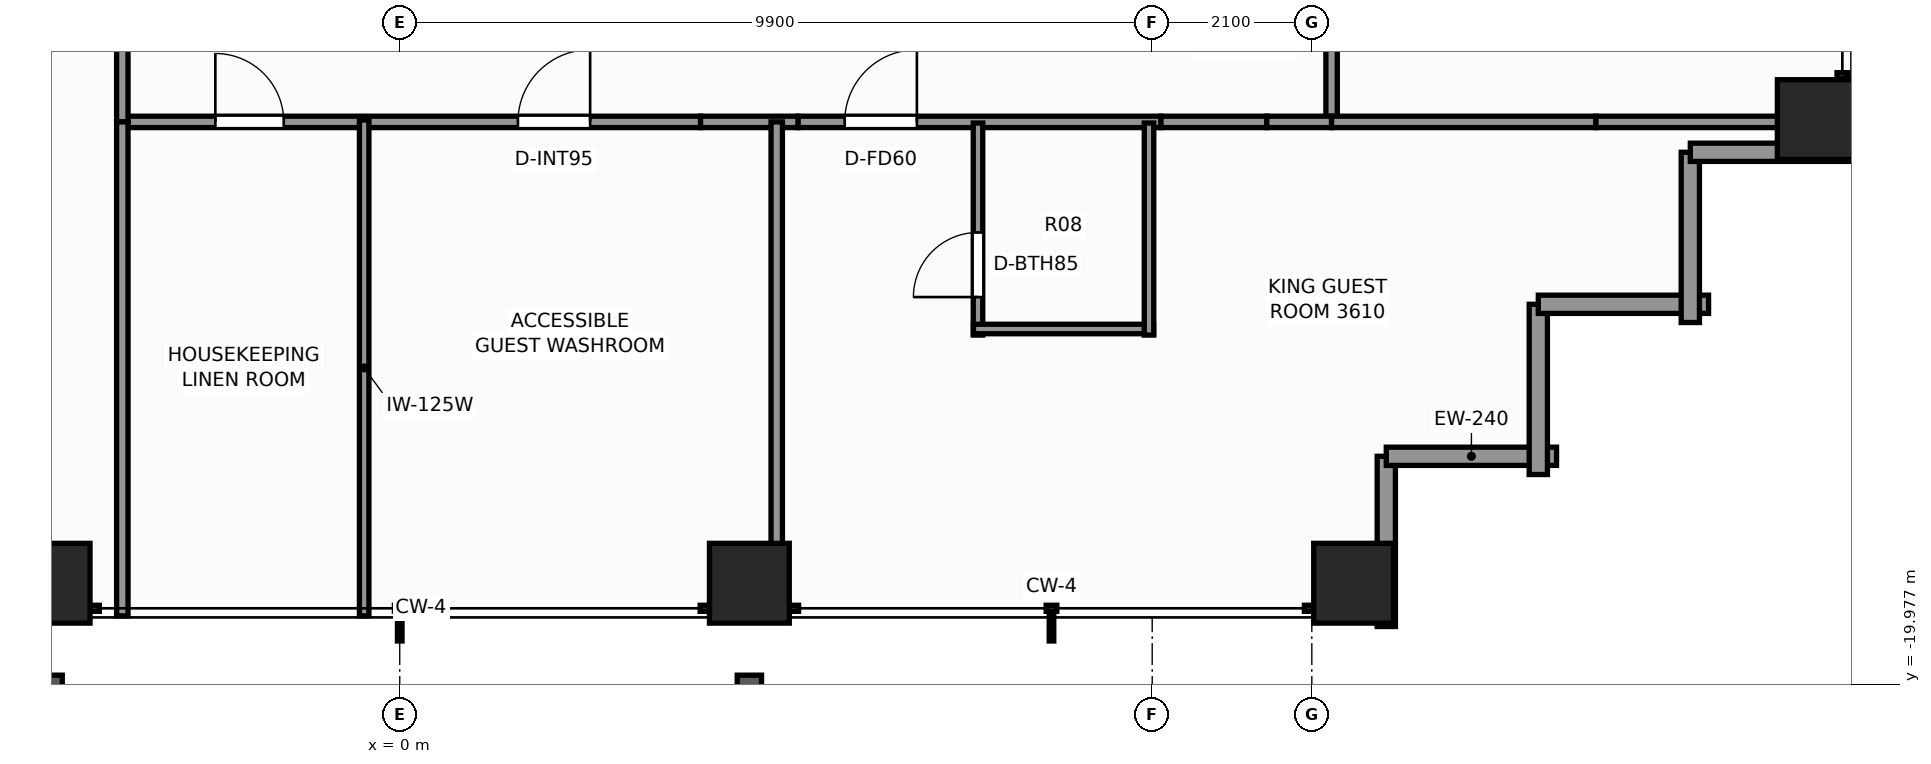
"""IFC4 building model, lengths in metres.
Left out: names, types, materials, properties, quantities, classifications, styles, units other than length and angle.
Written with IfcOpenShell. Run it as: python <this file> out.ifc"""

import sys

from ifc_helpers import new_model, si_unit, direction, frame, frame_2d, origin, origin_2d, place, context, subcontext, project, spatial, rectangle, extrude, element, fill, save


model = new_model("IFC4")
c1 = context("Model", 3, precision=1e-05, world=origin(), true_north=direction((0.0, 1.0)))
c2 = subcontext(c1, "Body", "Model", "MODEL_VIEW")
j1 = project(units=[si_unit("LENGTHUNIT", "METRE"), si_unit("PLANEANGLEUNIT", "RADIAN")], contexts=[c1])
p1 = place(None, origin())
s1 = spatial("IfcSite", under=j1, at=p1, CompositionType="ELEMENT")
p2 = place(p1, origin())
s2 = spatial("IfcBuilding", under=s1, at=p2, CompositionType="ELEMENT")
p3 = place(p2, frame((0.0, 0.0, 125.0)))
s3 = spatial("IfcBuildingStorey", under=s2, at=p3, CompositionType="ELEMENT", Elevation=125.0)
for number, where, z_axis, x_axis in (
    (1, (-4.6, -18.65, 0.0), (0.0, 0.0, 1.0), (1.0, 0.0, 0.0)),
    (2, (4.6, -18.65, 0.0), (0.0, 0.0, 1.0), (1.0, 0.0, 0.0)),
    (3, (12.55, -18.65, 0.0), (0.0, 0.0, 1.0), (1.0, 0.0, 0.0)),
    (4, (18.65, -12.55, 0.0), (0.0, 0.0, 1.0), (1.0, 0.0, 0.0)),
):
    element("IfcColumn", number, at=place(p3, frame(where, z_axis=z_axis, x_axis=x_axis)), inside=s3, PredefinedType="COLUMN", context=c2, shape_type="SweptSolid", body=[
        extrude(rectangle(XDim=1.05, YDim=1.05, at=origin_2d()), origin(), (0.0, 0.0, 1.0), 3.3),
    ])
for number, where, z_axis, x_axis in (
    (5, (12.98, -16.98, 0.0), (0.0, 0.0, 1.0), (0.0, -1.0, 0.0)),
    (6, (15.22, -16.98, 0.0), (0.0, 0.0, 1.0), (-1.0, 0.0, 0.0)),
    (7, (14.98, -14.98, 0.0), (0.0, 0.0, 1.0), (0.0, -1.0, 0.0)),
    (8, (17.22, -14.98, 0.0), (0.0, 0.0, 1.0), (-1.0, 0.0, 0.0)),
    (9, (16.98, -12.98, 0.0), (0.0, 0.0, 1.0), (0.0, -1.0, 0.0)),
    (10, (19.22, -12.98, 0.0), (0.0, 0.0, 1.0), (-1.0, 0.0, 0.0)),
):
    element("IfcWall", number, at=place(p3, frame(where, z_axis=z_axis, x_axis=x_axis)), inside=s3, PredefinedType="STANDARD", context=c2, shape_type="SweptSolid", body=[
        extrude(rectangle(XDim=2.24, YDim=0.24, at=frame_2d((1.12, 0.0))), origin(), (0.0, 0.0, 1.0), 1.295),
    ])
p4 = place(p3, frame((12.26, -12.58, 0.0), z_axis=(0.0, 0.0, 1.0), x_axis=(0.0, 1.0, 0.0)))
e11 = element("IfcWall", 11, at=p4, inside=s3, PredefinedType="PARTITIONING", context=c2, shape_type="SweptSolid", body=[
    extrude(rectangle(XDim=1.27, YDim=0.15, at=frame_2d((0.635, 0.0))), origin(), (0.0, 0.0, 1.0), 3.1),
])
p5 = place(p3, frame((-3.65, -12.58, 0.0), z_axis=(0.0, 0.0, 1.0), x_axis=(1.0, 0.0, 0.0)))
e12 = element("IfcWall", 12, at=p5, inside=s3, PredefinedType="PARTITIONING", context=c2, shape_type="SweptSolid", body=[
    extrude(rectangle(XDim=7.608, YDim=0.15, at=frame_2d((3.804, 0.0))), origin(), (0.0, 0.0, 1.0), 2.625),
])
p6 = place(p5, frame((1.224, 0.0, 0.0)))
e13 = element("IfcOpeningElement", 13, at=p6, cuts=e12, PredefinedType="OPENING", context=c2, shape_type="SweptSolid", body=[
    extrude(rectangle(XDim=0.9, YDim=2.06, at=frame_2d((0.45, 1.03))), frame((0.0, 0.085, 0.0), z_axis=(0.0, -1.0, 0.0), x_axis=(1.0, 0.0, 0.0)), (0.0, 0.0, 1.0), 0.17),
])
p7 = place(p5, frame((5.205, 0.0, 0.0)))
e14 = element("IfcOpeningElement", 14, at=p7, cuts=e12, PredefinedType="OPENING", context=c2, shape_type="SweptSolid", body=[
    extrude(rectangle(XDim=0.95, YDim=2.06, at=frame_2d((0.475, 1.03))), frame((0.0, 0.085, 0.0), z_axis=(0.0, -1.0, 0.0), x_axis=(1.0, 0.0, 0.0)), (0.0, 0.0, 1.0), 0.17),
])
p8 = place(p3, frame((3.958, -12.58, 0.0), z_axis=(0.0, 0.0, 1.0), x_axis=(1.0, 0.0, 0.0)))
e15 = element("IfcWall", 15, at=p8, inside=s3, PredefinedType="PARTITIONING", context=c2, shape_type="SweptSolid", body=[
    extrude(rectangle(XDim=1.284, YDim=0.15, at=frame_2d((0.642, 0.0))), origin(), (0.0, 0.0, 1.0), 1.285),
])
p9 = place(p3, frame((5.242, -12.58, 0.0), z_axis=(0.0, 0.0, 1.0), x_axis=(1.0, 0.0, 0.0)))
e16 = element("IfcWall", 16, at=p9, inside=s3, PredefinedType="PARTITIONING", context=c2, shape_type="SweptSolid", body=[
    extrude(rectangle(XDim=4.774, YDim=0.15, at=frame_2d((2.387, 0.0))), origin(), (0.0, 0.0, 1.0), 3.1),
])
p10 = place(p9, frame((0.612, 0.0, 0.0)))
e17 = element("IfcOpeningElement", 17, at=p10, cuts=e16, PredefinedType="OPENING", context=c2, shape_type="SweptSolid", body=[
    extrude(rectangle(XDim=0.95, YDim=2.06, at=frame_2d((0.475, 1.03))), frame((0.0, 0.085, 0.0), z_axis=(0.0, -1.0, 0.0), x_axis=(1.0, 0.0, 0.0)), (0.0, 0.0, 1.0), 0.17),
])
p11 = place(p3, frame((10.016, -12.58, 0.0), z_axis=(0.0, 0.0, 1.0), x_axis=(1.0, 0.0, 0.0)))
e18 = element("IfcWall", 18, at=p11, inside=s3, PredefinedType="PARTITIONING", context=c2, shape_type="SweptSolid", body=[
    extrude(rectangle(XDim=1.392, YDim=0.15, at=frame_2d((0.696, 0.0))), origin(), (0.0, 0.0, 1.0), 1.285),
])
p12 = place(p3, frame((11.407, -12.58, 0.0), z_axis=(0.0, 0.0, 1.0), x_axis=(1.0, 0.0, 0.0)))
e19 = element("IfcWall", 19, at=p12, inside=s3, PredefinedType="PARTITIONING", context=c2, shape_type="SweptSolid", body=[
    extrude(rectangle(XDim=0.853, YDim=0.15, at=frame_2d((0.426, 0.0))), origin(), (0.0, 0.0, 1.0), 3.1),
])
p13 = place(p3, frame((-3.65, -12.58, 0.0), z_axis=(0.0, 0.0, 1.0), x_axis=(0.0, 1.0, 0.0)))
e20 = element("IfcWall", 20, at=p13, inside=s3, PredefinedType="PARTITIONING", context=c2, shape_type="SweptSolid", body=[
    extrude(rectangle(XDim=2.68, YDim=0.15, at=frame_2d((1.34, 0.0))), origin(), (0.0, 0.0, 1.0), 3.1),
])
p14 = place(p3, frame((12.26, -12.58, 0.0), z_axis=(0.0, 0.0, 1.0), x_axis=(1.0, 0.0, 0.0)))
e21 = element("IfcWall", 21, at=p14, inside=s3, PredefinedType="PARTITIONING", context=c2, shape_type="SweptSolid", body=[
    extrude(rectangle(XDim=3.478, YDim=0.15, at=frame_2d((1.739, 0.0))), origin(), (0.0, 0.0, 1.0), 3.1),
])
p15 = place(p3, frame((15.738, -12.58, 0.0), z_axis=(0.0, 0.0, 1.0), x_axis=(1.0, 0.0, 0.0)))
e22 = element("IfcWall", 22, at=p15, inside=s3, PredefinedType="PARTITIONING", context=c2, shape_type="SweptSolid", body=[
    extrude(rectangle(XDim=2.74, YDim=0.15, at=frame_2d((1.37, 0.0))), origin(), (0.0, 0.0, 1.0), 1.285),
])
p16 = place(p3, frame((18.478, -12.58, 0.0), z_axis=(0.0, 0.0, 1.0), x_axis=(1.0, 0.0, 0.0)))
e23 = element("IfcWall", 23, at=p16, inside=s3, PredefinedType="PARTITIONING", context=c2, shape_type="SweptSolid", body=[
    extrude(rectangle(XDim=0.602, YDim=0.15, at=frame_2d((0.301, 0.0))), origin(), (0.0, 0.0, 1.0), 3.1),
])
p17 = place(p3, frame((-3.65, -19.08, 0.0), z_axis=(0.0, 0.0, 1.0), x_axis=(0.0, 1.0, 0.0)))
e24 = element("IfcWall", 24, at=p17, inside=s3, PredefinedType="PARTITIONING", context=c2, shape_type="SweptSolid", body=[
    extrude(rectangle(XDim=6.5, YDim=0.15, at=frame_2d((3.25, 0.0))), origin(), (0.0, 0.0, 1.0), 2.469),
])
p18 = place(p3, frame((4.96, -19.08, 0.0), z_axis=(0.0, 0.0, 1.0), x_axis=(0.0, 1.0, 0.0)))
e25 = element("IfcWall", 25, at=p18, inside=s3, PredefinedType="PARTITIONING", context=c2, shape_type="SweptSolid", body=[
    extrude(rectangle(XDim=0.636, YDim=0.15, at=frame_2d((0.318, 0.0))), origin(), (0.0, 0.0, 1.0), 2.469),
])
p19 = place(p3, frame((4.96, -18.444, 0.0), z_axis=(0.0, 0.0, 1.0), x_axis=(0.0, 1.0, 0.0)))
e26 = element("IfcWall", 26, at=p19, inside=s3, PredefinedType="PARTITIONING", context=c2, shape_type="SweptSolid", body=[
    extrude(rectangle(XDim=5.864, YDim=0.15, at=frame_2d((2.932, 0.0))), origin(), (0.0, 0.0, 1.0), 1.285),
])
p20 = place(p3, frame((-0.468, -19.08, 0.0), z_axis=(0.0, 0.0, 1.0), x_axis=(0.0, 1.0, 0.0)))
e27 = element("IfcWall", 27, at=p20, inside=s3, PredefinedType="PARTITIONING", context=c2, shape_type="SweptSolid", body=[
    extrude(rectangle(XDim=6.525, YDim=0.125, at=frame_2d((3.263, 0.0))), origin(), (0.0, 0.0, 1.0), 2.469),
])
p21 = place(p3, frame((7.608, -15.385, 0.0), z_axis=(0.0, 0.0, 1.0), x_axis=(0.0, 1.0, 0.0)))
e28 = element("IfcWall", 28, at=p21, inside=s3, PredefinedType="PARTITIONING", context=c2, shape_type="SweptSolid", body=[
    extrude(rectangle(XDim=2.79, YDim=0.125, at=frame_2d((1.395, 0.0))), origin(), (0.0, 0.0, 1.0), 3.1),
])
p22 = place(p21, frame((0.5, 0.0, 0.0)))
e29 = element("IfcOpeningElement", 29, at=p22, cuts=e28, PredefinedType="OPENING", context=c2, shape_type="SweptSolid", body=[
    extrude(rectangle(XDim=0.85, YDim=2.03, at=frame_2d((0.425, 1.015))), frame((0.0, 0.073, 0.0), z_axis=(0.0, -1.0, 0.0), x_axis=(1.0, 0.0, 0.0)), (0.0, 0.0, 1.0), 0.145),
])
p23 = place(p3, frame((7.548, -15.305, 0.0), z_axis=(0.0, 0.0, 1.0), x_axis=(1.0, 0.0, 0.0)))
e30 = element("IfcWall", 30, at=p23, inside=s3, PredefinedType="PARTITIONING", context=c2, shape_type="SweptSolid", body=[
    extrude(rectangle(XDim=2.37, YDim=0.125, at=frame_2d((1.185, 0.0))), origin(), (0.0, 0.0, 1.0), 3.1),
])
p24 = place(p3, frame((9.858, -15.385, 0.0), z_axis=(0.0, 0.0, 1.0), x_axis=(0.0, 1.0, 0.0)))
e31 = element("IfcWall", 31, at=p24, inside=s3, PredefinedType="PARTITIONING", context=c2, shape_type="SweptSolid", body=[
    extrude(rectangle(XDim=2.79, YDim=0.125, at=frame_2d((1.395, 0.0))), origin(), (0.0, 0.0, 1.0), 3.1),
])
p25 = place(p6, origin())
e32 = element("IfcDoor", 32, at=p25, inside=s3, OperationType="SINGLE_SWING_LEFT", PredefinedType="DOOR", context=c2, shape_type="SweptSolid", body=[
    extrude(rectangle(XDim=0.9, YDim=2.06, at=frame_2d((0.45, 1.03))), frame((0.0, 0.025, 0.0), z_axis=(0.0, -1.0, 0.0), x_axis=(1.0, 0.0, 0.0)), (0.0, 0.0, 1.0), 0.05),
])
fill(e13, e32)
p26 = place(p7, origin())
e33 = element("IfcDoor", 33, at=p26, inside=s3, OperationType="SINGLE_SWING_RIGHT", PredefinedType="DOOR", context=c2, shape_type="SweptSolid", body=[
    extrude(rectangle(XDim=0.95, YDim=2.06, at=frame_2d((0.475, 1.03))), frame((0.0, 0.025, 0.0), z_axis=(0.0, -1.0, 0.0), x_axis=(1.0, 0.0, 0.0)), (0.0, 0.0, 1.0), 0.05),
])
fill(e14, e33)
p27 = place(p22, origin())
e34 = element("IfcDoor", 34, at=p27, inside=s3, OperationType="SINGLE_SWING_LEFT", PredefinedType="DOOR", context=c2, shape_type="SweptSolid", body=[
    extrude(rectangle(XDim=0.85, YDim=2.03, at=frame_2d((0.425, 1.015))), frame((0.0, 0.025, 0.0), z_axis=(0.0, -1.0, 0.0), x_axis=(1.0, 0.0, 0.0)), (0.0, 0.0, 1.0), 0.05),
])
fill(e29, e34)
p28 = place(p10, origin())
e35 = element("IfcDoor", 35, at=p28, inside=s3, OperationType="SINGLE_SWING_RIGHT", PredefinedType="DOOR", context=c2, shape_type="SweptSolid", body=[
    extrude(rectangle(XDim=0.95, YDim=2.06, at=frame_2d((0.475, 1.03))), frame((0.0, 0.025, 0.0), z_axis=(0.0, -1.0, 0.0), x_axis=(1.0, 0.0, 0.0)), (0.0, 0.0, 1.0), 0.05),
])
fill(e17, e35)
save(model, sys.argv[1])
